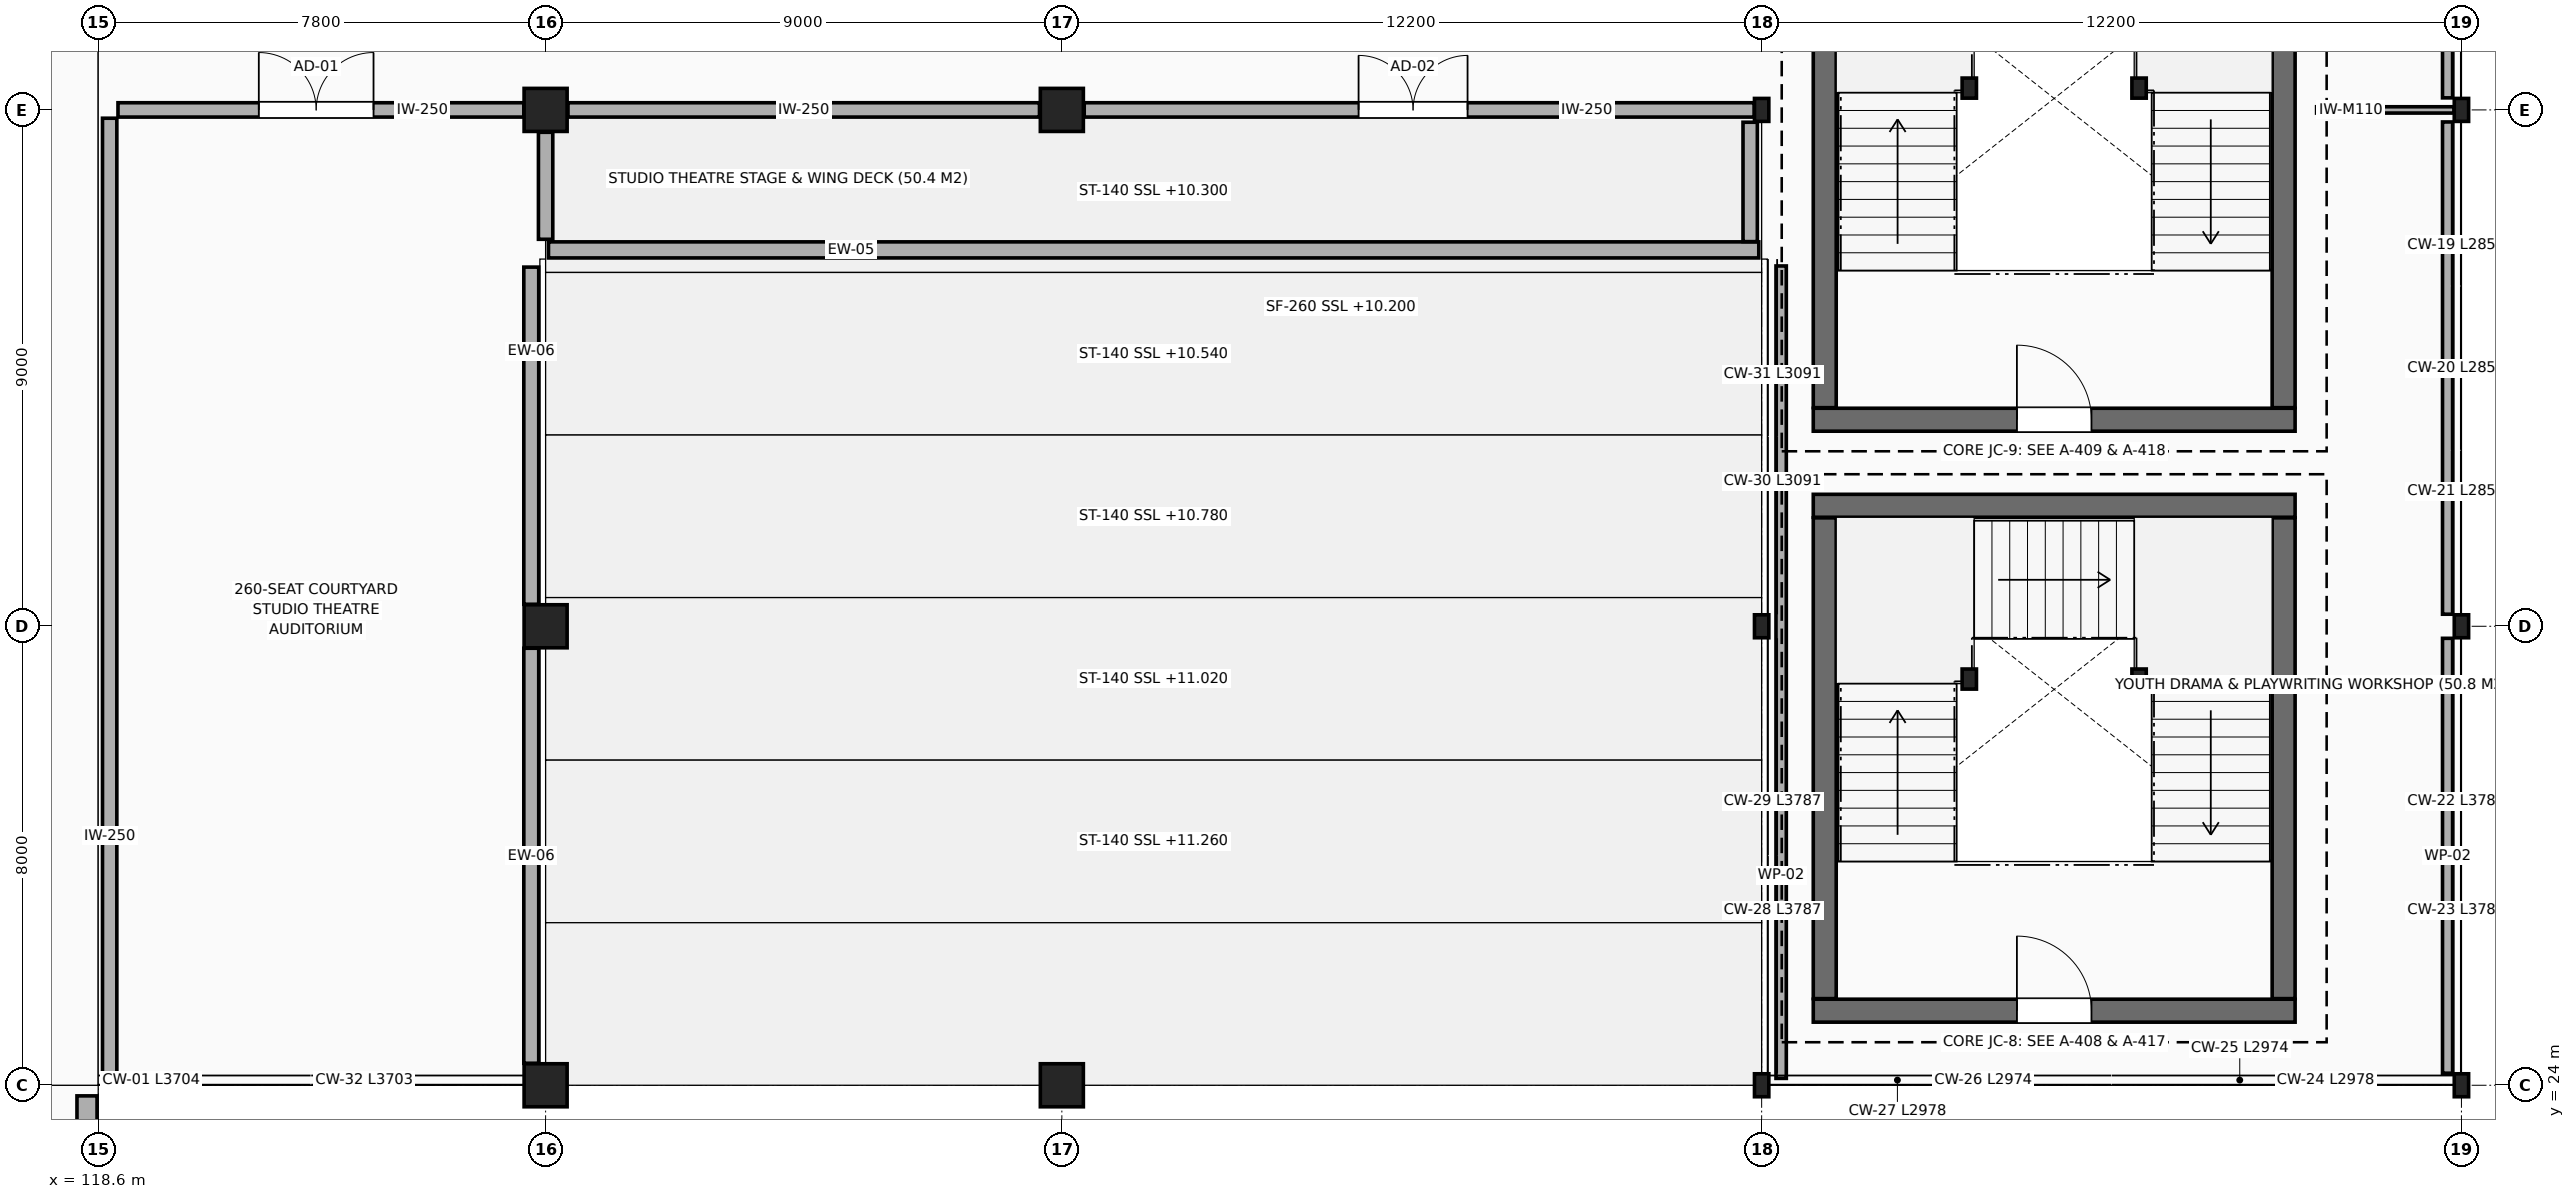
"""IFC4 building model, lengths in metres.
Left out: names, types, materials, properties, quantities, classifications, styles, units other than length and angle.
Written with IfcOpenShell. Run it as: python <this file> out.ifc"""

import sys

from ifc_helpers import new_model, si_unit, direction, frame, frame_2d, origin, origin_2d, place, context, subcontext, project, spatial, rectangle, i_section, extrude, element, fill, save


model = new_model("IFC4")
c1 = context("Model", 3, precision=1e-05, world=origin(), true_north=direction((0.0, 1.0)))
c2 = subcontext(c1, "Body", "Model", "MODEL_VIEW")
j1 = project(units=[si_unit("LENGTHUNIT", "METRE"), si_unit("PLANEANGLEUNIT", "RADIAN")], contexts=[c1])
p1 = place(None, origin())
s1 = spatial("IfcSite", under=j1, at=p1, CompositionType="ELEMENT")
p2 = place(p1, origin())
s2 = spatial("IfcBuilding", under=s1, at=p2, CompositionType="ELEMENT")
p3 = place(p2, frame((0.0, 0.0, 10.2)))
s3 = spatial("IfcBuildingStorey", under=s2, at=p3, CompositionType="ELEMENT", Elevation=10.2)
for number, where, z_axis, x_axis in (
    (1, (126.4, 24.0, 0.0), (0.0, 0.0, 1.0), (1.0, 0.0, 0.0)),
    (2, (126.4, 32.0, 0.0), (0.0, 0.0, 1.0), (1.0, 0.0, 0.0)),
    (3, (126.4, 41.0, 0.0), (0.0, 0.0, 1.0), (1.0, 0.0, 0.0)),
    (4, (135.4, 24.0, 0.0), (0.0, 0.0, 1.0), (1.0, 0.0, 0.0)),
    (5, (135.4, 41.0, 0.0), (0.0, 0.0, 1.0), (1.0, 0.0, 0.0)),
):
    element("IfcColumn", number, at=place(p3, frame(where, z_axis=z_axis, x_axis=x_axis)), inside=s3, PredefinedType="COLUMN", context=c2, shape_type="SweptSolid", body=[
        extrude(rectangle(XDim=0.75, YDim=0.75, at=origin_2d()), origin(), (0.0, 0.0, 1.0), 4.8),
    ])
for number, where, z_axis, x_axis in (
    (6, (147.6, 24.0, 0.0), (0.0, 0.0, 1.0), (1.0, 0.0, 0.0)),
    (7, (147.6, 32.0, 0.0), (0.0, 0.0, 1.0), (1.0, 0.0, 0.0)),
    (8, (147.6, 41.0, 0.0), (0.0, 0.0, 1.0), (1.0, 0.0, 0.0)),
    (9, (159.8, 24.0, 0.0), (0.0, 0.0, 1.0), (1.0, 0.0, 0.0)),
    (10, (159.8, 32.0, 0.0), (0.0, 0.0, 1.0), (1.0, 0.0, 0.0)),
    (11, (159.8, 41.0, 0.0), (0.0, 0.0, 1.0), (1.0, 0.0, 0.0)),
):
    element("IfcColumn", number, at=place(p3, frame(where, z_axis=z_axis, x_axis=x_axis)), inside=s3, PredefinedType="COLUMN", context=c2, shape_type="SweptSolid", body=[
        extrude(i_section(OverallWidth=0.25, OverallDepth=0.4, WebThickness=0.01, FlangeThickness=0.013, FilletRadius=0.014, at=origin_2d()), origin(), (0.0, 0.0, 1.0), 4.8),
    ])
for number, where, z_axis, x_axis in (
    (12, (151.22, 31.08, 0.0), (0.0, 0.0, 1.0), (1.0, 0.0, 0.0)),
    (13, (154.18, 31.08, 0.0), (0.0, 0.0, 1.0), (1.0, 0.0, 0.0)),
    (14, (151.22, 41.38, 0.0), (0.0, 0.0, 1.0), (1.0, 0.0, 0.0)),
    (15, (154.18, 41.38, 0.0), (0.0, 0.0, 1.0), (1.0, 0.0, 0.0)),
):
    element("IfcColumn", number, at=place(p3, frame(where, z_axis=z_axis, x_axis=x_axis)), inside=s3, PredefinedType="COLUMN", context=c2, shape_type="SweptSolid", body=[
        extrude(i_section(OverallWidth=0.25, OverallDepth=0.35, WebThickness=0.01, FlangeThickness=0.012, FilletRadius=0.012, at=origin_2d()), origin(), (0.0, 0.0, 1.0), 4.76),
    ])
for number, where, z_axis, x_axis in (
    (16, (159.56, 49.79, 0.0), (0.0, 0.0, 1.0), (0.0, -1.0, 0.0)),
    (17, (159.56, 40.79, 0.0), (0.0, 0.0, 1.0), (0.0, -1.0, 0.0)),
):
    element("IfcWall", number, at=place(p3, frame(where, z_axis=z_axis, x_axis=x_axis)), inside=s3, PredefinedType="PARAPET", context=c2, shape_type="SweptSolid", body=[
        extrude(rectangle(XDim=8.58, YDim=0.18, at=frame_2d((4.29, 0.0))), origin(), (0.0, 0.0, 1.0), 0.88),
    ])
p4 = place(p3, frame((159.56, 31.79, 0.0), z_axis=(0.0, 0.0, 1.0), x_axis=(0.0, -1.0, 0.0)))
e18 = element("IfcWall", 18, at=p4, inside=s3, PredefinedType="PARAPET", context=c2, shape_type="SweptSolid", body=[
    extrude(rectangle(XDim=7.58, YDim=0.18, at=frame_2d((3.79, 0.0))), origin(), (0.0, 0.0, 1.0), 0.88),
])
p5 = place(p3, frame((147.94, 24.12, 0.0), z_axis=(0.0, 0.0, 1.0), x_axis=(0.0, 1.0, 0.0)))
e19 = element("IfcWall", 19, at=p5, inside=s3, PredefinedType="PARAPET", context=c2, shape_type="SweptSolid", body=[
    extrude(rectangle(XDim=14.16, YDim=0.18, at=frame_2d((7.08, 0.0))), origin(), (0.0, 0.0, 1.0), 0.88),
])
p6 = place(p3, frame((147.55, 38.56, 0.0), z_axis=(0.0, 0.0, 1.0), x_axis=(-1.0, 0.0, 0.0)))
e20 = element("IfcWall", 20, at=p6, inside=s3, PredefinedType="STANDARD", context=c2, shape_type="SweptSolid", body=[
    extrude(rectangle(XDim=21.1, YDim=0.28, at=frame_2d((10.55, 0.0))), origin(), (0.0, 0.0, 1.0), 4.54),
])
p7 = place(p3, frame((126.15, 38.26, 0.0), z_axis=(0.0, 0.0, 1.0), x_axis=(0.0, -1.0, 0.0)))
e21 = element("IfcWall", 21, at=p7, inside=s3, PredefinedType="ELEMENTEDWALL", context=c2, shape_type="SweptSolid", body=[
    extrude(rectangle(XDim=5.877, YDim=0.26, at=frame_2d((2.938, 0.0))), origin(), (0.0, 0.0, 1.0), 3.775),
])
p8 = place(p3, frame((126.15, 31.617, 0.0), z_axis=(0.0, 0.0, 1.0), x_axis=(0.0, -1.0, 0.0)))
e22 = element("IfcWall", 22, at=p8, inside=s3, PredefinedType="ELEMENTEDWALL", context=c2, shape_type="SweptSolid", body=[
    extrude(rectangle(XDim=7.234, YDim=0.26, at=frame_2d((3.617, 0.0))), origin(), (0.0, 0.0, 1.0), 3.675),
])
p9 = place(p3, frame((118.405, 23.815, 0.0), z_axis=(0.0, 0.0, 1.0), x_axis=(0.0, -1.0, 0.0)))
e23 = element("IfcWall", 23, at=p9, inside=s3, PredefinedType="STANDARD", context=c2, shape_type="SweptSolid", body=[
    extrude(rectangle(XDim=13.63, YDim=0.35, at=frame_2d((6.815, 0.0))), origin(), (0.0, 0.0, 1.0), 3.725),
])
p10 = place(p3, frame((148.5, 25.3, 0.0), z_axis=(0.0, 0.0, 1.0), x_axis=(1.0, 0.0, 0.0)))
e24 = element("IfcWall", 24, at=p10, inside=s3, PredefinedType="SHEAR", context=c2, shape_type="SweptSolid", body=[
    extrude(rectangle(XDim=8.4, YDim=0.4, at=frame_2d((4.2, 0.0))), origin(), (0.0, 0.0, 1.0), 4.54),
])
p11 = place(p10, frame((3.55, 0.0, 0.0)))
e25 = element("IfcOpeningElement", 25, at=p11, cuts=e24, PredefinedType="OPENING", context=c2, shape_type="SweptSolid", body=[
    extrude(rectangle(XDim=1.3, YDim=2.15, at=frame_2d((0.65, 1.075))), frame((0.0, 0.21, 0.0), z_axis=(0.0, -1.0, 0.0), x_axis=(1.0, 0.0, 0.0)), (0.0, 0.0, 1.0), 0.42),
])
p12 = place(p3, frame((156.9, 34.1, 0.0), z_axis=(0.0, 0.0, 1.0), x_axis=(-1.0, 0.0, 0.0)))
e26 = element("IfcWall", 26, at=p12, inside=s3, PredefinedType="SHEAR", context=c2, shape_type="SweptSolid", body=[
    extrude(rectangle(XDim=8.4, YDim=0.4, at=frame_2d((4.2, 0.0))), origin(), (0.0, 0.0, 1.0), 4.54),
])
for number, where, z_axis, x_axis in (
    (27, (156.7, 25.51, 0.0), (0.0, 0.0, 1.0), (0.0, 1.0, 0.0)),
    (28, (148.7, 33.89, 0.0), (0.0, 0.0, 1.0), (0.0, -1.0, 0.0)),
):
    element("IfcWall", number, at=place(p3, frame(where, z_axis=z_axis, x_axis=x_axis)), inside=s3, PredefinedType="SHEAR", context=c2, shape_type="SweptSolid", body=[
        extrude(rectangle(XDim=8.38, YDim=0.4, at=frame_2d((4.19, 0.0))), origin(), (0.0, 0.0, 1.0), 4.54),
    ])
p13 = place(p3, frame((148.5, 35.6, 0.0), z_axis=(0.0, 0.0, 1.0), x_axis=(1.0, 0.0, 0.0)))
e29 = element("IfcWall", 29, at=p13, inside=s3, PredefinedType="SHEAR", context=c2, shape_type="SweptSolid", body=[
    extrude(rectangle(XDim=8.4, YDim=0.4, at=frame_2d((4.2, 0.0))), origin(), (0.0, 0.0, 1.0), 4.54),
])
p14 = place(p13, frame((3.55, 0.0, 0.0)))
e30 = element("IfcOpeningElement", 30, at=p14, cuts=e29, PredefinedType="OPENING", context=c2, shape_type="SweptSolid", body=[
    extrude(rectangle(XDim=1.3, YDim=2.15, at=frame_2d((0.65, 1.075))), frame((0.0, 0.21, 0.0), z_axis=(0.0, -1.0, 0.0), x_axis=(1.0, 0.0, 0.0)), (0.0, 0.0, 1.0), 0.42),
])
for number, where, z_axis, x_axis in (
    (31, (156.7, 35.81, 0.0), (0.0, 0.0, 1.0), (0.0, 1.0, 0.0)),
    (32, (148.7, 44.19, 0.0), (0.0, 0.0, 1.0), (0.0, -1.0, 0.0)),
):
    element("IfcWall", number, at=place(p3, frame(where, z_axis=z_axis, x_axis=x_axis)), inside=s3, PredefinedType="SHEAR", context=c2, shape_type="SweptSolid", body=[
        extrude(rectangle(XDim=8.38, YDim=0.4, at=frame_2d((4.19, 0.0))), origin(), (0.0, 0.0, 1.0), 4.54),
    ])
p15 = place(p3, frame((118.945, 41.0, 0.0), z_axis=(0.0, 0.0, 1.0), x_axis=(1.0, 0.0, 0.0)))
e33 = element("IfcWall", 33, at=p15, inside=s3, PredefinedType="PARTITIONING", context=c2, shape_type="SweptSolid", body=[
    extrude(rectangle(XDim=7.076, YDim=0.25, at=frame_2d((3.538, 0.0))), origin(), (0.0, 0.0, 1.0), 4.22),
])
p16 = place(p15, frame((2.455, 0.0, 0.0)))
e34 = element("IfcOpeningElement", 34, at=p16, cuts=e33, PredefinedType="OPENING", context=c2, shape_type="SweptSolid", body=[
    extrude(rectangle(XDim=2.0, YDim=2.35, at=frame_2d((1.0, 1.175))), frame((0.0, 0.135, 0.0), z_axis=(0.0, -1.0, 0.0), x_axis=(1.0, 0.0, 0.0)), (0.0, 0.0, 1.0), 0.27),
])
p17 = place(p3, frame((118.8, 24.176, 0.0), z_axis=(0.0, 0.0, 1.0), x_axis=(0.0, 1.0, 0.0)))
e35 = element("IfcWall", 35, at=p17, inside=s3, PredefinedType="PARTITIONING", context=c2, shape_type="SweptSolid", body=[
    extrude(rectangle(XDim=16.679, YDim=0.25, at=frame_2d((8.339, 0.0))), origin(), (0.0, 0.0, 1.0), 3.72),
])
p18 = place(p3, frame((126.79, 41.0, 0.0), z_axis=(0.0, 0.0, 1.0), x_axis=(1.0, 0.0, 0.0)))
e36 = element("IfcWall", 36, at=p18, inside=s3, PredefinedType="PARTITIONING", context=c2, shape_type="SweptSolid", body=[
    extrude(rectangle(XDim=8.22, YDim=0.25, at=frame_2d((4.11, 0.0))), origin(), (0.0, 0.0, 1.0), 3.92),
])
p19 = place(p3, frame((135.79, 41.0, 0.0), z_axis=(0.0, 0.0, 1.0), x_axis=(1.0, 0.0, 0.0)))
e37 = element("IfcWall", 37, at=p19, inside=s3, PredefinedType="PARTITIONING", context=c2, shape_type="SweptSolid", body=[
    extrude(rectangle(XDim=11.681, YDim=0.25, at=frame_2d((5.84, 0.0))), origin(), (0.0, 0.0, 1.0), 3.97),
])
p20 = place(p19, frame((4.783, 0.0, 0.0)))
e38 = element("IfcOpeningElement", 38, at=p20, cuts=e37, PredefinedType="OPENING", context=c2, shape_type="SweptSolid", body=[
    extrude(rectangle(XDim=1.9, YDim=2.35, at=frame_2d((0.95, 1.175))), frame((0.0, 0.135, 0.0), z_axis=(0.0, -1.0, 0.0), x_axis=(1.0, 0.0, 0.0)), (0.0, 0.0, 1.0), 0.27),
])
p21 = place(p3, frame((147.4, 40.785, 0.0), z_axis=(0.0, 0.0, 1.0), x_axis=(0.0, -1.0, 0.0)))
e39 = element("IfcWall", 39, at=p21, inside=s3, PredefinedType="PARTITIONING", context=c2, shape_type="SweptSolid", body=[
    extrude(rectangle(XDim=2.081, YDim=0.25, at=frame_2d((1.041, 0.0))), origin(), (0.0, 0.0, 1.0), 4.02),
])
p22 = place(p3, frame((126.4, 38.745, 0.0), z_axis=(0.0, 0.0, 1.0), x_axis=(0.0, 1.0, 0.0)))
e40 = element("IfcWall", 40, at=p22, inside=s3, PredefinedType="PARTITIONING", context=c2, shape_type="SweptSolid", body=[
    extrude(rectangle(XDim=1.865, YDim=0.25, at=frame_2d((0.933, 0.0))), origin(), (0.0, 0.0, 1.0), 3.77),
])
p23 = place(p3, frame((157.275, 41.0, 0.0), z_axis=(0.0, 0.0, 1.0), x_axis=(1.0, 0.0, 0.0)))
e41 = element("IfcWall", 41, at=p23, inside=s3, PredefinedType="MOVABLE", context=c2, shape_type="SweptSolid", body=[
    extrude(rectangle(XDim=2.396, YDim=0.11, at=frame_2d((1.198, 0.0))), origin(), (0.0, 0.0, 1.0), 4.53),
])
p24 = place(p11, origin())
e42 = element("IfcDoor", 42, at=p24, inside=s3, OperationType="SINGLE_SWING_LEFT", PredefinedType="DOOR", context=c2, shape_type="SweptSolid", body=[
    extrude(rectangle(XDim=1.3, YDim=2.15, at=frame_2d((0.65, 1.075))), frame((0.0, 0.025, 0.0), z_axis=(0.0, -1.0, 0.0), x_axis=(1.0, 0.0, 0.0)), (0.0, 0.0, 1.0), 0.05),
])
fill(e25, e42)
p25 = place(p14, origin())
e43 = element("IfcDoor", 43, at=p25, inside=s3, OperationType="SINGLE_SWING_LEFT", PredefinedType="DOOR", context=c2, shape_type="SweptSolid", body=[
    extrude(rectangle(XDim=1.3, YDim=2.15, at=frame_2d((0.65, 1.075))), frame((0.0, 0.025, 0.0), z_axis=(0.0, -1.0, 0.0), x_axis=(1.0, 0.0, 0.0)), (0.0, 0.0, 1.0), 0.05),
])
fill(e30, e43)
p26 = place(p16, origin())
e44 = element("IfcDoor", 44, at=p26, inside=s3, OperationType="DOUBLE_SWING_LEFT", PredefinedType="DOOR", context=c2, shape_type="SweptSolid", body=[
    extrude(rectangle(XDim=2.0, YDim=2.35, at=frame_2d((1.0, 1.175))), frame((0.0, 0.025, 0.0), z_axis=(0.0, -1.0, 0.0), x_axis=(1.0, 0.0, 0.0)), (0.0, 0.0, 1.0), 0.05),
])
fill(e34, e44)
p27 = place(p20, origin())
e45 = element("IfcDoor", 45, at=p27, inside=s3, OperationType="DOUBLE_SWING_RIGHT", PredefinedType="DOOR", context=c2, shape_type="SweptSolid", body=[
    extrude(rectangle(XDim=1.9, YDim=2.35, at=frame_2d((0.95, 1.175))), frame((0.0, 0.025, 0.0), z_axis=(0.0, -1.0, 0.0), x_axis=(1.0, 0.0, 0.0)), (0.0, 0.0, 1.0), 0.05),
])
fill(e38, e45)
save(model, sys.argv[1])
